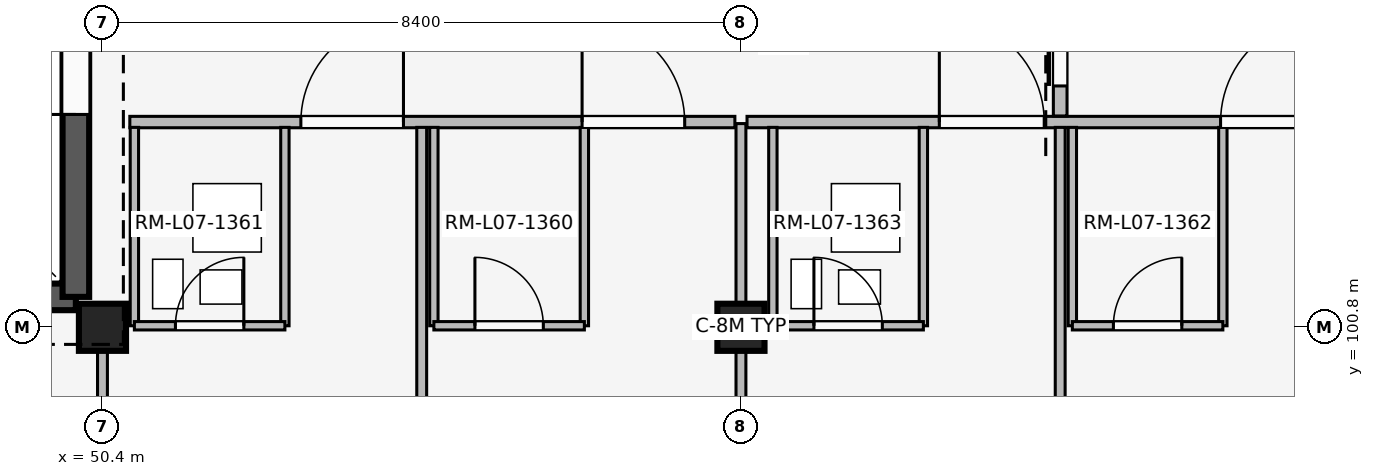
"""IFC4 building model, lengths in metres.
Left out: names, types, materials, properties, quantities, classifications, styles, units other than length and angle.
Written with IfcOpenShell. Run it as: python <this file> out.ifc"""

import sys

from ifc_helpers import new_model, si_unit, direction, frame, frame_2d, origin, origin_2d, place, context, subcontext, project, spatial, rectangle, extrude, element, fill, save


model = new_model("IFC4")
c1 = context("Model", 3, precision=1e-05, world=origin(), true_north=direction((0.0, 1.0)))
c2 = subcontext(c1, "Body", "Model", "MODEL_VIEW")
j1 = project(units=[si_unit("LENGTHUNIT", "METRE"), si_unit("PLANEANGLEUNIT", "RADIAN")], contexts=[c1])
p1 = place(None, origin())
s1 = spatial("IfcSite", under=j1, at=p1, CompositionType="ELEMENT")
p2 = place(p1, origin())
s2 = spatial("IfcBuilding", under=s1, at=p2, CompositionType="ELEMENT")
p3 = place(p2, frame((0.0, 0.0, 28.8)))
s3 = spatial("IfcBuildingStorey", under=s2, at=p3, CompositionType="ELEMENT", Elevation=28.8)
for number, where, z_axis, x_axis in (
    (1, (50.4, 100.8, 0.0), (0.0, 0.0, 1.0), (1.0, 0.0, 0.0)),
    (2, (58.8, 100.8, 0.0), (0.0, 0.0, 1.0), (1.0, 0.0, 0.0)),
):
    element("IfcColumn", number, at=place(p3, frame(where, z_axis=z_axis, x_axis=x_axis)), inside=s3, PredefinedType="COLUMN", context=c2, shape_type="SweptSolid", body=[
        extrude(rectangle(XDim=0.62, YDim=0.62, at=origin_2d()), origin(), (0.0, 0.0, 1.0), 4.2),
    ])
p4 = place(p3, frame((42.55, 101.2, 0.0), z_axis=(0.0, 0.0, 1.0), x_axis=(1.0, 0.0, 0.0)))
e3 = element("IfcWall", 3, at=p4, inside=s3, PredefinedType="SHEAR", context=c2, shape_type="SweptSolid", body=[
    extrude(rectangle(XDim=7.5, YDim=0.35, at=frame_2d((3.75, 0.0))), origin(), (0.0, 0.0, 1.0), 3.94),
])
p5 = place(p4, frame((4.85, 0.0, 0.0)))
e4 = element("IfcOpeningElement", 4, at=p5, cuts=e3, PredefinedType="OPENING", context=c2, shape_type="SweptSolid", body=[
    extrude(rectangle(XDim=1.2, YDim=2.2, at=frame_2d((0.6, 1.1))), frame((0.0, 0.185, 0.0), z_axis=(0.0, -1.0, 0.0), x_axis=(1.0, 0.0, 0.0)), (0.0, 0.0, 1.0), 0.37),
])
p6 = place(p3, frame((50.05, 101.2, 0.0), z_axis=(0.0, 0.0, 1.0), x_axis=(0.0, 1.0, 0.0)))
e5 = element("IfcWall", 5, at=p6, inside=s3, PredefinedType="SHEAR", context=c2, shape_type="SweptSolid", body=[
    extrude(rectangle(XDim=7.55, YDim=0.35, at=frame_2d((3.775, 0.0))), origin(), (0.0, 0.0, 1.0), 3.94),
])
p7 = place(p6, frame((2.4, 0.0, 0.0)))
e6 = element("IfcOpeningElement", 6, at=p7, cuts=e5, PredefinedType="OPENING", context=c2, shape_type="SweptSolid", body=[
    extrude(rectangle(XDim=1.2, YDim=2.2, at=frame_2d((0.6, 1.1))), frame((0.0, 0.185, 0.0), z_axis=(0.0, -1.0, 0.0), x_axis=(1.0, 0.0, 0.0)), (0.0, 0.0, 1.0), 0.37),
])
p8 = place(p3, frame((50.4, 92.54, 0.0), z_axis=(0.0, 0.0, 1.0), x_axis=(0.0, 1.0, 0.0)))
e7 = element("IfcWall", 7, at=p8, inside=s3, PredefinedType="PARTITIONING", context=c2, shape_type="SweptSolid", body=[
    extrude(rectangle(XDim=8.21, YDim=0.13, at=frame_2d((4.105, 0.0))), origin(), (0.0, 0.0, 1.0), 3.32),
])
p9 = place(p8, frame((3.64, 0.0, 0.0)))
e8 = element("IfcOpeningElement", 8, at=p9, cuts=e7, PredefinedType="OPENING", context=c2, shape_type="SweptSolid", body=[
    extrude(rectangle(XDim=1.08, YDim=2.15, at=frame_2d((0.54, 1.075))), frame((0.0, 0.075, 0.0), z_axis=(0.0, -1.0, 0.0), x_axis=(1.0, 0.0, 0.0)), (0.0, 0.0, 1.0), 0.15),
])
p10 = place(p3, frame((50.76, 103.5, 0.0), z_axis=(0.0, 0.0, 1.0), x_axis=(1.0, 0.0, 0.0)))
e9 = element("IfcWall", 9, at=p10, inside=s3, PredefinedType="PARTITIONING", context=c2, shape_type="SweptSolid", body=[
    extrude(rectangle(XDim=7.96, YDim=0.15, at=frame_2d((3.98, 0.0))), origin(), (0.0, 0.0, 1.0), 3.32),
])
p11 = place(p10, frame((2.25, 0.0, 0.0)))
e10 = element("IfcOpeningElement", 10, at=p11, cuts=e9, PredefinedType="OPENING", context=c2, shape_type="SweptSolid", body=[
    extrude(rectangle(XDim=1.35, YDim=2.25, at=frame_2d((0.675, 1.125))), frame((0.0, 0.085, 0.0), z_axis=(0.0, -1.0, 0.0), x_axis=(1.0, 0.0, 0.0)), (0.0, 0.0, 1.0), 0.17),
])
p12 = place(p10, frame((5.95, 0.0, 0.0)))
e11 = element("IfcOpeningElement", 11, at=p12, cuts=e9, PredefinedType="OPENING", context=c2, shape_type="SweptSolid", body=[
    extrude(rectangle(XDim=1.35, YDim=2.25, at=frame_2d((0.675, 1.125))), frame((0.0, 0.085, 0.0), z_axis=(0.0, -1.0, 0.0), x_axis=(1.0, 0.0, 0.0)), (0.0, 0.0, 1.0), 0.17),
])
p13 = place(p3, frame((54.6, 92.5, 0.0), z_axis=(0.0, 0.0, 1.0), x_axis=(0.0, 1.0, 0.0)))
e12 = element("IfcWall", 12, at=p13, inside=s3, PredefinedType="PARTITIONING", context=c2, shape_type="SweptSolid", body=[
    extrude(rectangle(XDim=10.93, YDim=0.13, at=frame_2d((5.465, 0.0))), origin(), (0.0, 0.0, 1.0), 3.32),
])
for number, where, z_axis, x_axis in (
    (13, (50.82, 100.82, 0.0), (0.0, 0.0, 1.0), (0.0, 1.0, 0.0)),
    (14, (52.8, 100.82, 0.0), (0.0, 0.0, 1.0), (0.0, 1.0, 0.0)),
):
    element("IfcWall", number, at=place(p3, frame(where, z_axis=z_axis, x_axis=x_axis)), inside=s3, PredefinedType="PARTITIONING", context=c2, shape_type="SweptSolid", body=[
        extrude(rectangle(XDim=2.61, YDim=0.11, at=frame_2d((1.305, 0.0))), origin(), (0.0, 0.0, 1.0), 3.32),
    ])
p14 = place(p3, frame((50.82, 100.82, 0.0), z_axis=(0.0, 0.0, 1.0), x_axis=(1.0, 0.0, 0.0)))
e15 = element("IfcWall", 15, at=p14, inside=s3, PredefinedType="PARTITIONING", context=c2, shape_type="SweptSolid", body=[
    extrude(rectangle(XDim=1.98, YDim=0.11, at=frame_2d((0.99, 0.0))), origin(), (0.0, 0.0, 1.0), 3.32),
])
p15 = place(p14, frame((0.54, 0.0, 0.0)))
e16 = element("IfcOpeningElement", 16, at=p15, cuts=e15, PredefinedType="OPENING", context=c2, shape_type="SweptSolid", body=[
    extrude(rectangle(XDim=0.9, YDim=2.1, at=frame_2d((0.45, 1.05))), frame((0.0, 0.065, 0.0), z_axis=(0.0, -1.0, 0.0), x_axis=(1.0, 0.0, 0.0)), (0.0, 0.0, 1.0), 0.13),
])
for number, where, z_axis, x_axis in (
    (17, (54.76, 100.82, 0.0), (0.0, 0.0, 1.0), (0.0, 1.0, 0.0)),
    (18, (56.74, 100.82, 0.0), (0.0, 0.0, 1.0), (0.0, 1.0, 0.0)),
):
    element("IfcWall", number, at=place(p3, frame(where, z_axis=z_axis, x_axis=x_axis)), inside=s3, PredefinedType="PARTITIONING", context=c2, shape_type="SweptSolid", body=[
        extrude(rectangle(XDim=2.61, YDim=0.11, at=frame_2d((1.305, 0.0))), origin(), (0.0, 0.0, 1.0), 3.32),
    ])
p16 = place(p3, frame((54.76, 100.82, 0.0), z_axis=(0.0, 0.0, 1.0), x_axis=(1.0, 0.0, 0.0)))
e19 = element("IfcWall", 19, at=p16, inside=s3, PredefinedType="PARTITIONING", context=c2, shape_type="SweptSolid", body=[
    extrude(rectangle(XDim=1.98, YDim=0.11, at=frame_2d((0.99, 0.0))), origin(), (0.0, 0.0, 1.0), 3.32),
])
p17 = place(p16, frame((0.54, 0.0, 0.0)))
e20 = element("IfcOpeningElement", 20, at=p17, cuts=e19, PredefinedType="OPENING", context=c2, shape_type="SweptSolid", body=[
    extrude(rectangle(XDim=0.9, YDim=2.1, at=frame_2d((0.45, 1.05))), frame((0.0, 0.065, 0.0), z_axis=(0.0, -1.0, 0.0), x_axis=(1.0, 0.0, 0.0)), (0.0, 0.0, 1.0), 0.13),
])
p18 = place(p3, frame((58.8, 92.54, 0.0), z_axis=(0.0, 0.0, 1.0), x_axis=(0.0, 1.0, 0.0)))
e21 = element("IfcWall", 21, at=p18, inside=s3, PredefinedType="PARTITIONING", context=c2, shape_type="SweptSolid", body=[
    extrude(rectangle(XDim=10.94, YDim=0.13, at=frame_2d((5.47, 0.0))), origin(), (0.0, 0.0, 1.0), 3.32),
])
p19 = place(p3, frame((58.88, 103.5, 0.0), z_axis=(0.0, 0.0, 1.0), x_axis=(1.0, 0.0, 0.0)))
e22 = element("IfcWall", 22, at=p19, inside=s3, PredefinedType="PARTITIONING", context=c2, shape_type="SweptSolid", body=[
    extrude(rectangle(XDim=8.24, YDim=0.15, at=frame_2d((4.12, 0.0))), origin(), (0.0, 0.0, 1.0), 3.32),
])
p20 = place(p19, frame((2.53, 0.0, 0.0)))
e23 = element("IfcOpeningElement", 23, at=p20, cuts=e22, PredefinedType="OPENING", context=c2, shape_type="SweptSolid", body=[
    extrude(rectangle(XDim=1.38, YDim=2.25, at=frame_2d((0.69, 1.125))), frame((0.0, 0.085, 0.0), z_axis=(0.0, -1.0, 0.0), x_axis=(1.0, 0.0, 0.0)), (0.0, 0.0, 1.0), 0.17),
])
p21 = place(p19, frame((6.23, 0.0, 0.0)))
e24 = element("IfcOpeningElement", 24, at=p21, cuts=e22, PredefinedType="OPENING", context=c2, shape_type="SweptSolid", body=[
    extrude(rectangle(XDim=1.38, YDim=2.25, at=frame_2d((0.69, 1.125))), frame((0.0, 0.085, 0.0), z_axis=(0.0, -1.0, 0.0), x_axis=(1.0, 0.0, 0.0)), (0.0, 0.0, 1.0), 0.17),
])
p22 = place(p3, frame((63.0, 92.5, 0.0), z_axis=(0.0, 0.0, 1.0), x_axis=(0.0, 1.0, 0.0)))
e25 = element("IfcWall", 25, at=p22, inside=s3, PredefinedType="PARTITIONING", context=c2, shape_type="SweptSolid", body=[
    extrude(rectangle(XDim=10.93, YDim=0.13, at=frame_2d((5.465, 0.0))), origin(), (0.0, 0.0, 1.0), 3.32),
])
for number, where, z_axis, x_axis in (
    (26, (59.22, 100.82, 0.0), (0.0, 0.0, 1.0), (0.0, 1.0, 0.0)),
    (27, (61.2, 100.82, 0.0), (0.0, 0.0, 1.0), (0.0, 1.0, 0.0)),
):
    element("IfcWall", number, at=place(p3, frame(where, z_axis=z_axis, x_axis=x_axis)), inside=s3, PredefinedType="PARTITIONING", context=c2, shape_type="SweptSolid", body=[
        extrude(rectangle(XDim=2.61, YDim=0.11, at=frame_2d((1.305, 0.0))), origin(), (0.0, 0.0, 1.0), 3.32),
    ])
p23 = place(p3, frame((59.22, 100.82, 0.0), z_axis=(0.0, 0.0, 1.0), x_axis=(1.0, 0.0, 0.0)))
e28 = element("IfcWall", 28, at=p23, inside=s3, PredefinedType="PARTITIONING", context=c2, shape_type="SweptSolid", body=[
    extrude(rectangle(XDim=1.98, YDim=0.11, at=frame_2d((0.99, 0.0))), origin(), (0.0, 0.0, 1.0), 3.32),
])
p24 = place(p23, frame((0.54, 0.0, 0.0)))
e29 = element("IfcOpeningElement", 29, at=p24, cuts=e28, PredefinedType="OPENING", context=c2, shape_type="SweptSolid", body=[
    extrude(rectangle(XDim=0.9, YDim=2.1, at=frame_2d((0.45, 1.05))), frame((0.0, 0.065, 0.0), z_axis=(0.0, -1.0, 0.0), x_axis=(1.0, 0.0, 0.0)), (0.0, 0.0, 1.0), 0.13),
])
for number, where, z_axis, x_axis in (
    (30, (63.16, 100.82, 0.0), (0.0, 0.0, 1.0), (0.0, 1.0, 0.0)),
    (31, (65.14, 100.82, 0.0), (0.0, 0.0, 1.0), (0.0, 1.0, 0.0)),
):
    element("IfcWall", number, at=place(p3, frame(where, z_axis=z_axis, x_axis=x_axis)), inside=s3, PredefinedType="PARTITIONING", context=c2, shape_type="SweptSolid", body=[
        extrude(rectangle(XDim=2.61, YDim=0.11, at=frame_2d((1.305, 0.0))), origin(), (0.0, 0.0, 1.0), 3.32),
    ])
p25 = place(p3, frame((63.16, 100.82, 0.0), z_axis=(0.0, 0.0, 1.0), x_axis=(1.0, 0.0, 0.0)))
e32 = element("IfcWall", 32, at=p25, inside=s3, PredefinedType="PARTITIONING", context=c2, shape_type="SweptSolid", body=[
    extrude(rectangle(XDim=1.98, YDim=0.11, at=frame_2d((0.99, 0.0))), origin(), (0.0, 0.0, 1.0), 3.32),
])
p26 = place(p25, frame((0.54, 0.0, 0.0)))
e33 = element("IfcOpeningElement", 33, at=p26, cuts=e32, PredefinedType="OPENING", context=c2, shape_type="SweptSolid", body=[
    extrude(rectangle(XDim=0.9, YDim=2.1, at=frame_2d((0.45, 1.05))), frame((0.0, 0.065, 0.0), z_axis=(0.0, -1.0, 0.0), x_axis=(1.0, 0.0, 0.0)), (0.0, 0.0, 1.0), 0.13),
])
p27 = place(p3, frame((63.0, 103.58, 0.0), z_axis=(0.0, 0.0, 1.0), x_axis=(0.0, 1.0, 0.0)))
e34 = element("IfcWall", 34, at=p27, inside=s3, PredefinedType="PARTITIONING", context=c2, shape_type="SweptSolid", body=[
    extrude(rectangle(XDim=2.84, YDim=0.18, at=frame_2d((1.42, 0.0))), origin(), (0.0, 0.0, 1.0), 3.32),
])
p28 = place(p27, frame((0.395, 0.0, 0.0)))
e35 = element("IfcOpeningElement", 35, at=p28, cuts=e34, PredefinedType="OPENING", context=c2, shape_type="SweptSolid", body=[
    extrude(rectangle(XDim=2.05, YDim=2.35, at=frame_2d((1.025, 1.175))), frame((0.0, 0.1, 0.0), z_axis=(0.0, -1.0, 0.0), x_axis=(1.0, 0.0, 0.0)), (0.0, 0.0, 1.0), 0.2),
])
p29 = place(p7, origin())
e36 = element("IfcDoor", 36, at=p29, inside=s3, OperationType="SINGLE_SWING_LEFT", PredefinedType="DOOR", context=c2, shape_type="SweptSolid", body=[
    extrude(rectangle(XDim=1.2, YDim=2.2, at=frame_2d((0.6, 1.1))), frame((0.0, 0.025, 0.0), z_axis=(0.0, -1.0, 0.0), x_axis=(1.0, 0.0, 0.0)), (0.0, 0.0, 1.0), 0.05),
])
fill(e6, e36)
p30 = place(p11, origin())
e37 = element("IfcDoor", 37, at=p30, inside=s3, OperationType="SINGLE_SWING_RIGHT", PredefinedType="DOOR", context=c2, shape_type="SweptSolid", body=[
    extrude(rectangle(XDim=1.35, YDim=2.25, at=frame_2d((0.675, 1.125))), frame((0.0, 0.025, 0.0), z_axis=(0.0, -1.0, 0.0), x_axis=(1.0, 0.0, 0.0)), (0.0, 0.0, 1.0), 0.05),
])
fill(e10, e37)
p31 = place(p12, origin())
e38 = element("IfcDoor", 38, at=p31, inside=s3, OperationType="SINGLE_SWING_LEFT", PredefinedType="DOOR", context=c2, shape_type="SweptSolid", body=[
    extrude(rectangle(XDim=1.35, YDim=2.25, at=frame_2d((0.675, 1.125))), frame((0.0, 0.025, 0.0), z_axis=(0.0, -1.0, 0.0), x_axis=(1.0, 0.0, 0.0)), (0.0, 0.0, 1.0), 0.05),
])
fill(e11, e38)
p32 = place(p15, origin())
e39 = element("IfcDoor", 39, at=p32, inside=s3, OperationType="SINGLE_SWING_RIGHT", PredefinedType="DOOR", context=c2, shape_type="SweptSolid", body=[
    extrude(rectangle(XDim=0.9, YDim=2.1, at=frame_2d((0.45, 1.05))), frame((0.0, 0.025, 0.0), z_axis=(0.0, -1.0, 0.0), x_axis=(1.0, 0.0, 0.0)), (0.0, 0.0, 1.0), 0.05),
])
fill(e16, e39)
p33 = place(p17, origin())
e40 = element("IfcDoor", 40, at=p33, inside=s3, OperationType="SINGLE_SWING_LEFT", PredefinedType="DOOR", context=c2, shape_type="SweptSolid", body=[
    extrude(rectangle(XDim=0.9, YDim=2.1, at=frame_2d((0.45, 1.05))), frame((0.0, 0.025, 0.0), z_axis=(0.0, -1.0, 0.0), x_axis=(1.0, 0.0, 0.0)), (0.0, 0.0, 1.0), 0.05),
])
fill(e20, e40)
p34 = place(p20, origin())
e41 = element("IfcDoor", 41, at=p34, inside=s3, OperationType="SINGLE_SWING_LEFT", PredefinedType="DOOR", context=c2, shape_type="SweptSolid", body=[
    extrude(rectangle(XDim=1.38, YDim=2.25, at=frame_2d((0.69, 1.125))), frame((0.0, 0.025, 0.0), z_axis=(0.0, -1.0, 0.0), x_axis=(1.0, 0.0, 0.0)), (0.0, 0.0, 1.0), 0.05),
])
fill(e23, e41)
p35 = place(p21, origin())
e42 = element("IfcDoor", 42, at=p35, inside=s3, OperationType="SINGLE_SWING_RIGHT", PredefinedType="DOOR", context=c2, shape_type="SweptSolid", body=[
    extrude(rectangle(XDim=1.38, YDim=2.25, at=frame_2d((0.69, 1.125))), frame((0.0, 0.025, 0.0), z_axis=(0.0, -1.0, 0.0), x_axis=(1.0, 0.0, 0.0)), (0.0, 0.0, 1.0), 0.05),
])
fill(e24, e42)
p36 = place(p24, origin())
e43 = element("IfcDoor", 43, at=p36, inside=s3, OperationType="SINGLE_SWING_LEFT", PredefinedType="DOOR", context=c2, shape_type="SweptSolid", body=[
    extrude(rectangle(XDim=0.9, YDim=2.1, at=frame_2d((0.45, 1.05))), frame((0.0, 0.025, 0.0), z_axis=(0.0, -1.0, 0.0), x_axis=(1.0, 0.0, 0.0)), (0.0, 0.0, 1.0), 0.05),
])
fill(e29, e43)
p37 = place(p26, origin())
e44 = element("IfcDoor", 44, at=p37, inside=s3, OperationType="SINGLE_SWING_RIGHT", PredefinedType="DOOR", context=c2, shape_type="SweptSolid", body=[
    extrude(rectangle(XDim=0.9, YDim=2.1, at=frame_2d((0.45, 1.05))), frame((0.0, 0.025, 0.0), z_axis=(0.0, -1.0, 0.0), x_axis=(1.0, 0.0, 0.0)), (0.0, 0.0, 1.0), 0.05),
])
fill(e33, e44)
p38 = place(p28, origin())
e45 = element("IfcDoor", 45, at=p38, inside=s3, OperationType="SLIDING_TO_LEFT", PredefinedType="DOOR", context=c2, shape_type="SweptSolid", body=[
    extrude(rectangle(XDim=2.05, YDim=2.35, at=frame_2d((1.025, 1.175))), frame((0.0, 0.025, 0.0), z_axis=(0.0, -1.0, 0.0), x_axis=(1.0, 0.0, 0.0)), (0.0, 0.0, 1.0), 0.05),
])
fill(e35, e45)
save(model, sys.argv[1])
